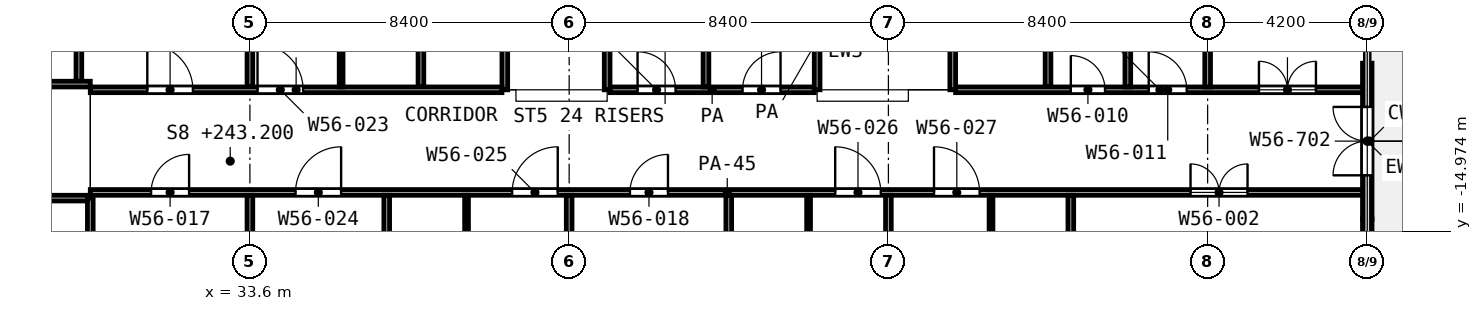
"""IFC4 building model, lengths in metres.
Left out: names, types, materials, properties, quantities, classifications, styles, units other than length and angle.
Written with IfcOpenShell. Run it as: python <this file> out.ifc"""

import sys

from ifc_helpers import new_model, si_unit, direction, frame, frame_2d, origin, place, context, subcontext, project, spatial, rectangle, extrude, element, fill, save


model = new_model("IFC4")
c1 = context("Model", 3, precision=1e-05, world=origin(), true_north=direction((0.0, 1.0)))
c2 = subcontext(c1, "Body", "Model", "MODEL_VIEW")
j1 = project(units=[si_unit("LENGTHUNIT", "METRE"), si_unit("PLANEANGLEUNIT", "RADIAN")], contexts=[c1])
p1 = place(None, origin())
s1 = spatial("IfcSite", under=j1, at=p1, CompositionType="ELEMENT")
p2 = place(p1, origin())
s2 = spatial("IfcBuilding", under=s1, at=p2, CompositionType="ELEMENT")
p3 = place(p2, frame((0.0, 0.0, 243.2)))
s3 = spatial("IfcBuildingStorey", under=s2, at=p3, CompositionType="ELEMENT", Elevation=243.2)
p4 = place(p3, frame((63.0, -18.75, 0.0), z_axis=(0.0, 0.0, 1.0), x_axis=(0.0, 1.0, 0.0)))
e1 = element("IfcWall", 1, at=p4, inside=s3, PredefinedType="SOLIDWALL", context=c2, shape_type="SweptSolid", body=[
    extrude(rectangle(XDim=4.1, YDim=0.25, at=frame_2d((2.05, 0.0))), origin(), (0.0, 0.0, 1.0), 2.58),
])
p5 = place(p4, frame((1.15, 0.0, 0.0)))
e2 = element("IfcOpeningElement", 2, at=p5, cuts=e1, PredefinedType="OPENING", context=c2, shape_type="SweptSolid", body=[
    extrude(rectangle(XDim=1.8, YDim=2.1, at=frame_2d((0.9, 1.05))), frame((0.0, 0.135, 0.0), z_axis=(0.0, -1.0, 0.0), x_axis=(1.0, 0.0, 0.0)), (0.0, 0.0, 1.0), 0.27),
])
p6 = place(p3, frame((63.0, -14.65, 0.0), z_axis=(0.0, 0.0, 1.0), x_axis=(0.0, 1.0, 0.0)))
e3 = element("IfcWall", 3, at=p6, inside=s3, PredefinedType="SOLIDWALL", context=c2, shape_type="SweptSolid", body=[
    extrude(rectangle(XDim=4.1, YDim=0.25, at=frame_2d((2.05, 0.0))), origin(), (0.0, 0.0, 1.0), 2.58),
])
p7 = place(p6, frame((1.15, 0.0, 0.0)))
e4 = element("IfcOpeningElement", 4, at=p7, cuts=e3, PredefinedType="OPENING", context=c2, shape_type="SweptSolid", body=[
    extrude(rectangle(XDim=1.8, YDim=2.1, at=frame_2d((0.9, 1.05))), frame((0.0, 0.135, 0.0), z_axis=(0.0, -1.0, 0.0), x_axis=(1.0, 0.0, 0.0)), (0.0, 0.0, 1.0), 0.27),
])
for number, where, z_axis, x_axis in (
    (5, (36.0, -11.175, 0.0), (0.0, 0.0, 1.0), (0.0, 1.0, 0.0)),
    (6, (39.3, -17.25, 0.0), (0.0, 0.0, 1.0), (0.0, 1.0, 0.0)),
    (7, (48.3, -17.25, 0.0), (0.0, 0.0, 1.0), (0.0, 1.0, 0.0)),
    (8, (53.1, -17.25, 0.0), (0.0, 0.0, 1.0), (0.0, 1.0, 0.0)),
):
    element("IfcWall", number, at=place(p3, frame(where, z_axis=z_axis, x_axis=x_axis)), inside=s3, PredefinedType="PARTITIONING", context=c2, shape_type="SweptSolid", body=[
        extrude(rectangle(XDim=3.225, YDim=0.1, at=frame_2d((1.613, 0.0))), origin(), (0.0, 0.0, 1.0), 3.6),
    ])
p8 = place(p3, frame((24.8, -14.1, 0.0), z_axis=(0.0, 0.0, 1.0), x_axis=(1.0, 0.0, 0.0)))
e9 = element("IfcWall", 9, at=p8, inside=s3, PredefinedType="PARTITIONING", context=c2, shape_type="SweptSolid", body=[
    extrude(rectangle(XDim=4.525, YDim=0.15, at=frame_2d((2.262, 0.0))), origin(), (0.0, 0.0, 1.0), 3.6),
])
p9 = place(p8, frame((1.75, 0.0, 0.0)))
e10 = element("IfcOpeningElement", 10, at=p9, cuts=e9, PredefinedType="OPENING", context=c2, shape_type="SweptSolid", body=[
    extrude(rectangle(XDim=1.5, YDim=2.1, at=frame_2d((0.75, 1.05))), frame((0.0, 0.085, 0.0), z_axis=(0.0, -1.0, 0.0), x_axis=(1.0, 0.0, 0.0)), (0.0, 0.0, 1.0), 0.17),
])
p10 = place(p3, frame((29.4, -13.95, 0.0), z_axis=(0.0, 0.0, 1.0), x_axis=(1.0, 0.0, 0.0)))
e11 = element("IfcWall", 11, at=p10, inside=s3, PredefinedType="PARTITIONING", context=c2, shape_type="SweptSolid", body=[
    extrude(rectangle(XDim=33.52, YDim=0.15, at=frame_2d((16.76, 0.0))), origin(), (0.0, 0.0, 1.0), 2.7),
])
p11 = place(p10, frame((1.6, 0.0, 0.0)))
e12 = element("IfcOpeningElement", 12, at=p11, cuts=e11, PredefinedType="OPENING", context=c2, shape_type="SweptSolid", body=[
    extrude(rectangle(XDim=1.0, YDim=2.1, at=frame_2d((0.5, 1.05))), frame((0.0, 0.085, 0.0), z_axis=(0.0, -1.0, 0.0), x_axis=(1.0, 0.0, 0.0)), (0.0, 0.0, 1.0), 0.17),
])
p12 = place(p10, frame((5.4, 0.0, 0.0)))
e13 = element("IfcOpeningElement", 13, at=p12, cuts=e11, PredefinedType="OPENING", context=c2, shape_type="SweptSolid", body=[
    extrude(rectangle(XDim=1.2, YDim=2.1, at=frame_2d((0.6, 1.05))), frame((0.0, 0.085, 0.0), z_axis=(0.0, -1.0, 0.0), x_axis=(1.0, 0.0, 0.0)), (0.0, 0.0, 1.0), 0.17),
])
p13 = place(p10, frame((11.1, 0.0, 0.0)))
e14 = element("IfcOpeningElement", 14, at=p13, cuts=e11, PredefinedType="OPENING", context=c2, shape_type="SweptSolid", body=[
    extrude(rectangle(XDim=1.2, YDim=2.1, at=frame_2d((0.6, 1.05))), frame((0.0, 0.085, 0.0), z_axis=(0.0, -1.0, 0.0), x_axis=(1.0, 0.0, 0.0)), (0.0, 0.0, 1.0), 0.17),
])
p14 = place(p10, frame((14.2, 0.0, 0.0)))
e15 = element("IfcOpeningElement", 15, at=p14, cuts=e11, PredefinedType="OPENING", context=c2, shape_type="SweptSolid", body=[
    extrude(rectangle(XDim=1.0, YDim=2.1, at=frame_2d((0.5, 1.05))), frame((0.0, 0.085, 0.0), z_axis=(0.0, -1.0, 0.0), x_axis=(1.0, 0.0, 0.0)), (0.0, 0.0, 1.0), 0.17),
])
p15 = place(p10, frame((19.6, 0.0, 0.0)))
e16 = element("IfcOpeningElement", 16, at=p15, cuts=e11, PredefinedType="OPENING", context=c2, shape_type="SweptSolid", body=[
    extrude(rectangle(XDim=1.2, YDim=2.1, at=frame_2d((0.6, 1.05))), frame((0.0, 0.085, 0.0), z_axis=(0.0, -1.0, 0.0), x_axis=(1.0, 0.0, 0.0)), (0.0, 0.0, 1.0), 0.17),
])
p16 = place(p10, frame((22.2, 0.0, 0.0)))
e17 = element("IfcOpeningElement", 17, at=p16, cuts=e11, PredefinedType="OPENING", context=c2, shape_type="SweptSolid", body=[
    extrude(rectangle(XDim=1.2, YDim=2.1, at=frame_2d((0.6, 1.05))), frame((0.0, 0.085, 0.0), z_axis=(0.0, -1.0, 0.0), x_axis=(1.0, 0.0, 0.0)), (0.0, 0.0, 1.0), 0.17),
])
p17 = place(p10, frame((28.95, 0.0, 0.0)))
e18 = element("IfcOpeningElement", 18, at=p17, cuts=e11, PredefinedType="OPENING", context=c2, shape_type="SweptSolid", body=[
    extrude(rectangle(XDim=1.5, YDim=2.1, at=frame_2d((0.75, 1.05))), frame((0.0, 0.085, 0.0), z_axis=(0.0, -1.0, 0.0), x_axis=(1.0, 0.0, 0.0)), (0.0, 0.0, 1.0), 0.17),
])
p18 = place(p3, frame((29.4, -11.25, 0.0), z_axis=(0.0, 0.0, 1.0), x_axis=(1.0, 0.0, 0.0)))
e19 = element("IfcWall", 19, at=p18, inside=s3, PredefinedType="PARTITIONING", context=c2, shape_type="SweptSolid", body=[
    extrude(rectangle(XDim=10.832, YDim=0.15, at=frame_2d((5.416, 0.0))), origin(), (0.0, 0.0, 1.0), 3.6),
])
p19 = place(p18, frame((1.5, 0.0, 0.0)))
e20 = element("IfcOpeningElement", 20, at=p19, cuts=e19, PredefinedType="OPENING", context=c2, shape_type="SweptSolid", body=[
    extrude(rectangle(XDim=1.2, YDim=2.1, at=frame_2d((0.6, 1.05))), frame((0.0, 0.085, 0.0), z_axis=(0.0, -1.0, 0.0), x_axis=(1.0, 0.0, 0.0)), (0.0, 0.0, 1.0), 0.17),
])
p20 = place(p18, frame((4.4, 0.0, 0.0)))
e21 = element("IfcOpeningElement", 21, at=p20, cuts=e19, PredefinedType="OPENING", context=c2, shape_type="SweptSolid", body=[
    extrude(rectangle(XDim=1.2, YDim=2.1, at=frame_2d((0.6, 1.05))), frame((0.0, 0.085, 0.0), z_axis=(0.0, -1.0, 0.0), x_axis=(1.0, 0.0, 0.0)), (0.0, 0.0, 1.0), 0.17),
])
p21 = place(p3, frame((43.075, -11.25, 0.0), z_axis=(0.0, 0.0, 1.0), x_axis=(1.0, 0.0, 0.0)))
e22 = element("IfcWall", 22, at=p21, inside=s3, PredefinedType="PARTITIONING", context=c2, shape_type="SweptSolid", body=[
    extrude(rectangle(XDim=5.375, YDim=0.15, at=frame_2d((2.688, 0.0))), origin(), (0.0, 0.0, 1.0), 3.6),
])
p22 = place(p21, frame((0.725, 0.0, 0.0)))
e23 = element("IfcOpeningElement", 23, at=p22, cuts=e22, PredefinedType="OPENING", context=c2, shape_type="SweptSolid", body=[
    extrude(rectangle(XDim=1.0, YDim=2.1, at=frame_2d((0.5, 1.05))), frame((0.0, 0.085, 0.0), z_axis=(0.0, -1.0, 0.0), x_axis=(1.0, 0.0, 0.0)), (0.0, 0.0, 1.0), 0.17),
])
p23 = place(p21, frame((3.487, 0.0, 0.0)))
e24 = element("IfcOpeningElement", 24, at=p23, cuts=e22, PredefinedType="OPENING", context=c2, shape_type="SweptSolid", body=[
    extrude(rectangle(XDim=1.0, YDim=2.1, at=frame_2d((0.5, 1.05))), frame((0.0, 0.085, 0.0), z_axis=(0.0, -1.0, 0.0), x_axis=(1.0, 0.0, 0.0)), (0.0, 0.0, 1.0), 0.17),
])
p24 = place(p3, frame((52.168, -11.25, 0.0), z_axis=(0.0, 0.0, 1.0), x_axis=(1.0, 0.0, 0.0)))
e25 = element("IfcWall", 25, at=p24, inside=s3, PredefinedType="PARTITIONING", context=c2, shape_type="SweptSolid", body=[
    extrude(rectangle(XDim=10.752, YDim=0.15, at=frame_2d((5.376, 0.0))), origin(), (0.0, 0.0, 1.0), 2.7),
])
p25 = place(p24, frame((3.032, 0.0, 0.0)))
e26 = element("IfcOpeningElement", 26, at=p25, cuts=e25, PredefinedType="OPENING", context=c2, shape_type="SweptSolid", body=[
    extrude(rectangle(XDim=0.9, YDim=2.1, at=frame_2d((0.45, 1.05))), frame((0.0, 0.085, 0.0), z_axis=(0.0, -1.0, 0.0), x_axis=(1.0, 0.0, 0.0)), (0.0, 0.0, 1.0), 0.17),
])
p26 = place(p24, frame((5.082, 0.0, 0.0)))
e27 = element("IfcOpeningElement", 27, at=p26, cuts=e25, PredefinedType="OPENING", context=c2, shape_type="SweptSolid", body=[
    extrude(rectangle(XDim=1.0, YDim=2.1, at=frame_2d((0.5, 1.05))), frame((0.0, 0.085, 0.0), z_axis=(0.0, -1.0, 0.0), x_axis=(1.0, 0.0, 0.0)), (0.0, 0.0, 1.0), 0.17),
])
p27 = place(p24, frame((7.982, 0.0, 0.0)))
e28 = element("IfcOpeningElement", 28, at=p27, cuts=e25, PredefinedType="OPENING", context=c2, shape_type="SweptSolid", body=[
    extrude(rectangle(XDim=1.5, YDim=2.1, at=frame_2d((0.75, 1.05))), frame((0.0, 0.085, 0.0), z_axis=(0.0, -1.0, 0.0), x_axis=(1.0, 0.0, 0.0)), (0.0, 0.0, 1.0), 0.17),
])
p28 = place(p3, frame((24.8, -11.1, 0.0), z_axis=(0.0, 0.0, 1.0), x_axis=(1.0, 0.0, 0.0)))
e29 = element("IfcWall", 29, at=p28, inside=s3, PredefinedType="PARTITIONING", context=c2, shape_type="SweptSolid", body=[
    extrude(rectangle(XDim=4.6, YDim=0.15, at=frame_2d((2.3, 0.0))), origin(), (0.0, 0.0, 1.0), 3.6),
])
p29 = place(p28, frame((1.85, 0.0, 0.0)))
e30 = element("IfcOpeningElement", 30, at=p29, cuts=e29, PredefinedType="OPENING", context=c2, shape_type="SweptSolid", body=[
    extrude(rectangle(XDim=1.0, YDim=2.1, at=frame_2d((0.5, 1.05))), frame((0.0, 0.085, 0.0), z_axis=(0.0, -1.0, 0.0), x_axis=(1.0, 0.0, 0.0)), (0.0, 0.0, 1.0), 0.17),
])
p30 = place(p3, frame((29.1, -11.025, 0.0), z_axis=(0.0, 0.0, 1.0), x_axis=(0.0, 1.0, 0.0)))
e31 = element("IfcWall", 31, at=p30, inside=s3, PredefinedType="PARTITIONING", context=c2, shape_type="SweptSolid", body=[
    extrude(rectangle(XDim=10.945, YDim=0.15, at=frame_2d((5.472, 0.0))), origin(), (0.0, 0.0, 1.0), 3.6),
])
p31 = place(p3, frame((29.4, -25.2, 0.0), z_axis=(0.0, 0.0, 1.0), x_axis=(0.0, 1.0, 0.0)))
e32 = element("IfcWall", 32, at=p31, inside=s3, PredefinedType="PARTITIONING", context=c2, shape_type="SweptSolid", body=[
    extrude(rectangle(XDim=11.1, YDim=0.15, at=frame_2d((5.55, 0.0))), origin(), (0.0, 0.0, 1.0), 3.6),
])
p32 = place(p3, frame((33.6, -25.12, 0.0), z_axis=(0.0, 0.0, 1.0), x_axis=(0.0, 1.0, 0.0)))
e33 = element("IfcWall", 33, at=p32, inside=s3, PredefinedType="PARTITIONING", context=c2, shape_type="SweptSolid", body=[
    extrude(rectangle(XDim=11.095, YDim=0.15, at=frame_2d((5.548, 0.0))), origin(), (0.0, 0.0, 1.0), 3.6),
])
p33 = place(p3, frame((33.6, -11.175, 0.0), z_axis=(0.0, 0.0, 1.0), x_axis=(0.0, 1.0, 0.0)))
e34 = element("IfcWall", 34, at=p33, inside=s3, PredefinedType="PARTITIONING", context=c2, shape_type="SweptSolid", body=[
    extrude(rectangle(XDim=11.095, YDim=0.15, at=frame_2d((5.547, 0.0))), origin(), (0.0, 0.0, 1.0), 3.6),
])
p34 = place(p3, frame((37.2, -25.12, 0.0), z_axis=(0.0, 0.0, 1.0), x_axis=(0.0, 1.0, 0.0)))
e35 = element("IfcWall", 35, at=p34, inside=s3, PredefinedType="PARTITIONING", context=c2, shape_type="SweptSolid", body=[
    extrude(rectangle(XDim=11.095, YDim=0.15, at=frame_2d((5.548, 0.0))), origin(), (0.0, 0.0, 1.0), 3.6),
])
p35 = place(p3, frame((38.1, -11.175, 0.0), z_axis=(0.0, 0.0, 1.0), x_axis=(0.0, 1.0, 0.0)))
e36 = element("IfcWall", 36, at=p35, inside=s3, PredefinedType="PARTITIONING", context=c2, shape_type="SweptSolid", body=[
    extrude(rectangle(XDim=11.095, YDim=0.15, at=frame_2d((5.547, 0.0))), origin(), (0.0, 0.0, 1.0), 3.6),
])
p36 = place(p3, frame((40.307, -11.25, 0.0), z_axis=(0.0, 0.0, 1.0), x_axis=(0.0, 1.0, 0.0)))
e37 = element("IfcWall", 37, at=p36, inside=s3, PredefinedType="PARTITIONING", context=c2, shape_type="SweptSolid", body=[
    extrude(rectangle(XDim=11.17, YDim=0.15, at=frame_2d((5.585, 0.0))), origin(), (0.0, 0.0, 1.0), 3.6),
])
p37 = place(p36, frame((5.125, 0.0, 0.0)))
e38 = element("IfcOpeningElement", 38, at=p37, cuts=e37, PredefinedType="OPENING", context=c2, shape_type="SweptSolid", body=[
    extrude(rectangle(XDim=1.0, YDim=2.1, at=frame_2d((0.5, 1.05))), frame((0.0, 0.085, 0.0), z_axis=(0.0, -1.0, 0.0), x_axis=(1.0, 0.0, 0.0)), (0.0, 0.0, 1.0), 0.17),
])
p38 = place(p3, frame((42.0, -25.12, 0.0), z_axis=(0.0, 0.0, 1.0), x_axis=(0.0, 1.0, 0.0)))
e39 = element("IfcWall", 39, at=p38, inside=s3, PredefinedType="PARTITIONING", context=c2, shape_type="SweptSolid", body=[
    extrude(rectangle(XDim=11.095, YDim=0.15, at=frame_2d((5.548, 0.0))), origin(), (0.0, 0.0, 1.0), 3.6),
])
p39 = place(p3, frame((43.0, -11.25, 0.0), z_axis=(0.0, 0.0, 1.0), x_axis=(0.0, 1.0, 0.0)))
e40 = element("IfcWall", 40, at=p39, inside=s3, PredefinedType="PARTITIONING", context=c2, shape_type="SweptSolid", body=[
    extrude(rectangle(XDim=2.4, YDim=0.15, at=frame_2d((1.2, 0.0))), origin(), (0.0, 0.0, 1.0), 3.6),
])
p40 = place(p3, frame((45.6, -11.175, 0.0), z_axis=(0.0, 0.0, 1.0), x_axis=(0.0, 1.0, 0.0)))
e41 = element("IfcWall", 41, at=p40, inside=s3, PredefinedType="PARTITIONING", context=c2, shape_type="SweptSolid", body=[
    extrude(rectangle(XDim=2.525, YDim=0.15, at=frame_2d((1.263, 0.0))), origin(), (0.0, 0.0, 1.0), 3.6),
])
p41 = place(p3, frame((46.2, -25.12, 0.0), z_axis=(0.0, 0.0, 1.0), x_axis=(0.0, 1.0, 0.0)))
e42 = element("IfcWall", 42, at=p41, inside=s3, PredefinedType="PARTITIONING", context=c2, shape_type="SweptSolid", body=[
    extrude(rectangle(XDim=11.095, YDim=0.15, at=frame_2d((5.548, 0.0))), origin(), (0.0, 0.0, 1.0), 3.6),
])
p42 = place(p3, frame((48.525, -11.25, 0.0), z_axis=(0.0, 0.0, 1.0), x_axis=(0.0, 1.0, 0.0)))
e43 = element("IfcWall", 43, at=p42, inside=s3, PredefinedType="PARTITIONING", context=c2, shape_type="SweptSolid", body=[
    extrude(rectangle(XDim=2.6, YDim=0.15, at=frame_2d((1.3, 0.0))), origin(), (0.0, 0.0, 1.0), 3.6),
])
p43 = place(p3, frame((50.4, -25.12, 0.0), z_axis=(0.0, 0.0, 1.0), x_axis=(0.0, 1.0, 0.0)))
e44 = element("IfcWall", 44, at=p43, inside=s3, PredefinedType="PARTITIONING", context=c2, shape_type="SweptSolid", body=[
    extrude(rectangle(XDim=11.095, YDim=0.15, at=frame_2d((5.548, 0.0))), origin(), (0.0, 0.0, 1.0), 3.6),
])
p44 = place(p3, frame((52.093, -11.25, 0.0), z_axis=(0.0, 0.0, 1.0), x_axis=(0.0, 1.0, 0.0)))
e45 = element("IfcWall", 45, at=p44, inside=s3, PredefinedType="PARTITIONING", context=c2, shape_type="SweptSolid", body=[
    extrude(rectangle(XDim=9.397, YDim=0.15, at=frame_2d((4.698, 0.0))), origin(), (0.0, 0.0, 1.0), 3.6),
])
p45 = place(p44, frame((4.199, 0.0, 0.0)))
e46 = element("IfcOpeningElement", 46, at=p45, cuts=e45, PredefinedType="OPENING", context=c2, shape_type="SweptSolid", body=[
    extrude(rectangle(XDim=1.0, YDim=2.1, at=frame_2d((0.5, 1.05))), frame((0.0, 0.085, 0.0), z_axis=(0.0, -1.0, 0.0), x_axis=(1.0, 0.0, 0.0)), (0.0, 0.0, 1.0), 0.17),
])
p46 = place(p3, frame((54.6, -11.175, 0.0), z_axis=(0.0, 0.0, 1.0), x_axis=(0.0, 1.0, 0.0)))
e47 = element("IfcWall", 47, at=p46, inside=s3, PredefinedType="PARTITIONING", context=c2, shape_type="SweptSolid", body=[
    extrude(rectangle(XDim=11.095, YDim=0.15, at=frame_2d((5.547, 0.0))), origin(), (0.0, 0.0, 1.0), 3.6),
])
p47 = place(p3, frame((55.2, -25.12, 0.0), z_axis=(0.0, 0.0, 1.0), x_axis=(0.0, 1.0, 0.0)))
e48 = element("IfcWall", 48, at=p47, inside=s3, PredefinedType="PARTITIONING", context=c2, shape_type="SweptSolid", body=[
    extrude(rectangle(XDim=11.095, YDim=0.15, at=frame_2d((5.548, 0.0))), origin(), (0.0, 0.0, 1.0), 3.6),
])
p48 = place(p3, frame((56.7, -11.175, 0.0), z_axis=(0.0, 0.0, 1.0), x_axis=(0.0, 1.0, 0.0)))
e49 = element("IfcWall", 49, at=p48, inside=s3, PredefinedType="PARTITIONING", context=c2, shape_type="SweptSolid", body=[
    extrude(rectangle(XDim=10.722, YDim=0.15, at=frame_2d((5.361, 0.0))), origin(), (0.0, 0.0, 1.0), 3.6),
])
p49 = place(p3, frame((58.8, -11.175, 0.0), z_axis=(0.0, 0.0, 1.0), x_axis=(0.0, 1.0, 0.0)))
e50 = element("IfcWall", 50, at=p49, inside=s3, PredefinedType="PARTITIONING", context=c2, shape_type="SweptSolid", body=[
    extrude(rectangle(XDim=2.325, YDim=0.15, at=frame_2d((1.163, 0.0))), origin(), (0.0, 0.0, 1.0), 3.6),
])
p50 = place(p7, origin())
e51 = element("IfcDoor", 51, at=p50, inside=s3, OperationType="DOUBLE_DOOR_SINGLE_SWING", PredefinedType="DOOR", context=c2, shape_type="SweptSolid", body=[
    extrude(rectangle(XDim=1.8, YDim=2.1, at=frame_2d((0.9, 1.05))), frame((0.0, 0.025, 0.0), z_axis=(0.0, -1.0, 0.0), x_axis=(1.0, 0.0, 0.0)), (0.0, 0.0, 1.0), 0.05),
])
fill(e4, e51)
p51 = place(p19, origin())
e52 = element("IfcDoor", 52, at=p51, inside=s3, OperationType="SINGLE_SWING_LEFT", PredefinedType="DOOR", context=c2, shape_type="SweptSolid", body=[
    extrude(rectangle(XDim=1.2, YDim=2.1, at=frame_2d((0.6, 1.05))), frame((0.0, 0.025, 0.0), z_axis=(0.0, -1.0, 0.0), x_axis=(1.0, 0.0, 0.0)), (0.0, 0.0, 1.0), 0.05),
])
fill(e20, e52)
p52 = place(p20, origin())
e53 = element("IfcDoor", 53, at=p52, inside=s3, OperationType="SINGLE_SWING_LEFT", PredefinedType="DOOR", context=c2, shape_type="SweptSolid", body=[
    extrude(rectangle(XDim=1.2, YDim=2.1, at=frame_2d((0.6, 1.05))), frame((0.0, 0.025, 0.0), z_axis=(0.0, -1.0, 0.0), x_axis=(1.0, 0.0, 0.0)), (0.0, 0.0, 1.0), 0.05),
])
fill(e21, e53)
p53 = place(p22, origin())
e54 = element("IfcDoor", 54, at=p53, inside=s3, OperationType="SINGLE_SWING_LEFT", PredefinedType="DOOR", context=c2, shape_type="SweptSolid", body=[
    extrude(rectangle(XDim=1.0, YDim=2.1, at=frame_2d((0.5, 1.05))), frame((0.0, 0.025, 0.0), z_axis=(0.0, -1.0, 0.0), x_axis=(1.0, 0.0, 0.0)), (0.0, 0.0, 1.0), 0.05),
])
fill(e23, e54)
p54 = place(p23, origin())
e55 = element("IfcDoor", 55, at=p54, inside=s3, OperationType="SINGLE_SWING_RIGHT", PredefinedType="DOOR", context=c2, shape_type="SweptSolid", body=[
    extrude(rectangle(XDim=1.0, YDim=2.1, at=frame_2d((0.5, 1.05))), frame((0.0, 0.025, 0.0), z_axis=(0.0, -1.0, 0.0), x_axis=(1.0, 0.0, 0.0)), (0.0, 0.0, 1.0), 0.05),
])
fill(e24, e55)
p55 = place(p11, origin())
e56 = element("IfcDoor", 56, at=p55, inside=s3, OperationType="SINGLE_SWING_RIGHT", PredefinedType="DOOR", context=c2, shape_type="SweptSolid", body=[
    extrude(rectangle(XDim=1.0, YDim=2.1, at=frame_2d((0.5, 1.05))), frame((0.0, 0.025, 0.0), z_axis=(0.0, -1.0, 0.0), x_axis=(1.0, 0.0, 0.0)), (0.0, 0.0, 1.0), 0.05),
])
fill(e12, e56)
p56 = place(p12, origin())
e57 = element("IfcDoor", 57, at=p56, inside=s3, OperationType="SINGLE_SWING_RIGHT", PredefinedType="DOOR", context=c2, shape_type="SweptSolid", body=[
    extrude(rectangle(XDim=1.2, YDim=2.1, at=frame_2d((0.6, 1.05))), frame((0.0, 0.025, 0.0), z_axis=(0.0, -1.0, 0.0), x_axis=(1.0, 0.0, 0.0)), (0.0, 0.0, 1.0), 0.05),
])
fill(e13, e57)
p57 = place(p13, origin())
e58 = element("IfcDoor", 58, at=p57, inside=s3, OperationType="SINGLE_SWING_RIGHT", PredefinedType="DOOR", context=c2, shape_type="SweptSolid", body=[
    extrude(rectangle(XDim=1.2, YDim=2.1, at=frame_2d((0.6, 1.05))), frame((0.0, 0.025, 0.0), z_axis=(0.0, -1.0, 0.0), x_axis=(1.0, 0.0, 0.0)), (0.0, 0.0, 1.0), 0.05),
])
fill(e14, e58)
p58 = place(p14, origin())
e59 = element("IfcDoor", 59, at=p58, inside=s3, OperationType="SINGLE_SWING_RIGHT", PredefinedType="DOOR", context=c2, shape_type="SweptSolid", body=[
    extrude(rectangle(XDim=1.0, YDim=2.1, at=frame_2d((0.5, 1.05))), frame((0.0, 0.025, 0.0), z_axis=(0.0, -1.0, 0.0), x_axis=(1.0, 0.0, 0.0)), (0.0, 0.0, 1.0), 0.05),
])
fill(e15, e59)
p59 = place(p15, origin())
e60 = element("IfcDoor", 60, at=p59, inside=s3, OperationType="SINGLE_SWING_LEFT", PredefinedType="DOOR", context=c2, shape_type="SweptSolid", body=[
    extrude(rectangle(XDim=1.2, YDim=2.1, at=frame_2d((0.6, 1.05))), frame((0.0, 0.025, 0.0), z_axis=(0.0, -1.0, 0.0), x_axis=(1.0, 0.0, 0.0)), (0.0, 0.0, 1.0), 0.05),
])
fill(e16, e60)
p60 = place(p16, origin())
e61 = element("IfcDoor", 61, at=p60, inside=s3, OperationType="SINGLE_SWING_LEFT", PredefinedType="DOOR", context=c2, shape_type="SweptSolid", body=[
    extrude(rectangle(XDim=1.2, YDim=2.1, at=frame_2d((0.6, 1.05))), frame((0.0, 0.025, 0.0), z_axis=(0.0, -1.0, 0.0), x_axis=(1.0, 0.0, 0.0)), (0.0, 0.0, 1.0), 0.05),
])
fill(e17, e61)
p61 = place(p17, origin())
e62 = element("IfcDoor", 62, at=p61, inside=s3, OperationType="DOUBLE_DOOR_SINGLE_SWING", PredefinedType="DOOR", context=c2, shape_type="SweptSolid", body=[
    extrude(rectangle(XDim=1.5, YDim=2.1, at=frame_2d((0.75, 1.05))), frame((0.0, 0.025, 0.0), z_axis=(0.0, -1.0, 0.0), x_axis=(1.0, 0.0, 0.0)), (0.0, 0.0, 1.0), 0.05),
])
fill(e18, e62)
p62 = place(p25, origin())
e63 = element("IfcDoor", 63, at=p62, inside=s3, OperationType="SINGLE_SWING_LEFT", PredefinedType="DOOR", context=c2, shape_type="SweptSolid", body=[
    extrude(rectangle(XDim=0.9, YDim=2.1, at=frame_2d((0.45, 1.05))), frame((0.0, 0.025, 0.0), z_axis=(0.0, -1.0, 0.0), x_axis=(1.0, 0.0, 0.0)), (0.0, 0.0, 1.0), 0.05),
])
fill(e26, e63)
p63 = place(p26, origin())
e64 = element("IfcDoor", 64, at=p63, inside=s3, OperationType="SINGLE_SWING_LEFT", PredefinedType="DOOR", context=c2, shape_type="SweptSolid", body=[
    extrude(rectangle(XDim=1.0, YDim=2.1, at=frame_2d((0.5, 1.05))), frame((0.0, 0.025, 0.0), z_axis=(0.0, -1.0, 0.0), x_axis=(1.0, 0.0, 0.0)), (0.0, 0.0, 1.0), 0.05),
])
fill(e27, e64)
p64 = place(p27, origin())
e65 = element("IfcDoor", 65, at=p64, inside=s3, OperationType="DOUBLE_DOOR_SINGLE_SWING", PredefinedType="DOOR", context=c2, shape_type="SweptSolid", body=[
    extrude(rectangle(XDim=1.5, YDim=2.1, at=frame_2d((0.75, 1.05))), frame((0.0, 0.025, 0.0), z_axis=(0.0, -1.0, 0.0), x_axis=(1.0, 0.0, 0.0)), (0.0, 0.0, 1.0), 0.05),
])
fill(e28, e65)
save(model, sys.argv[1])
